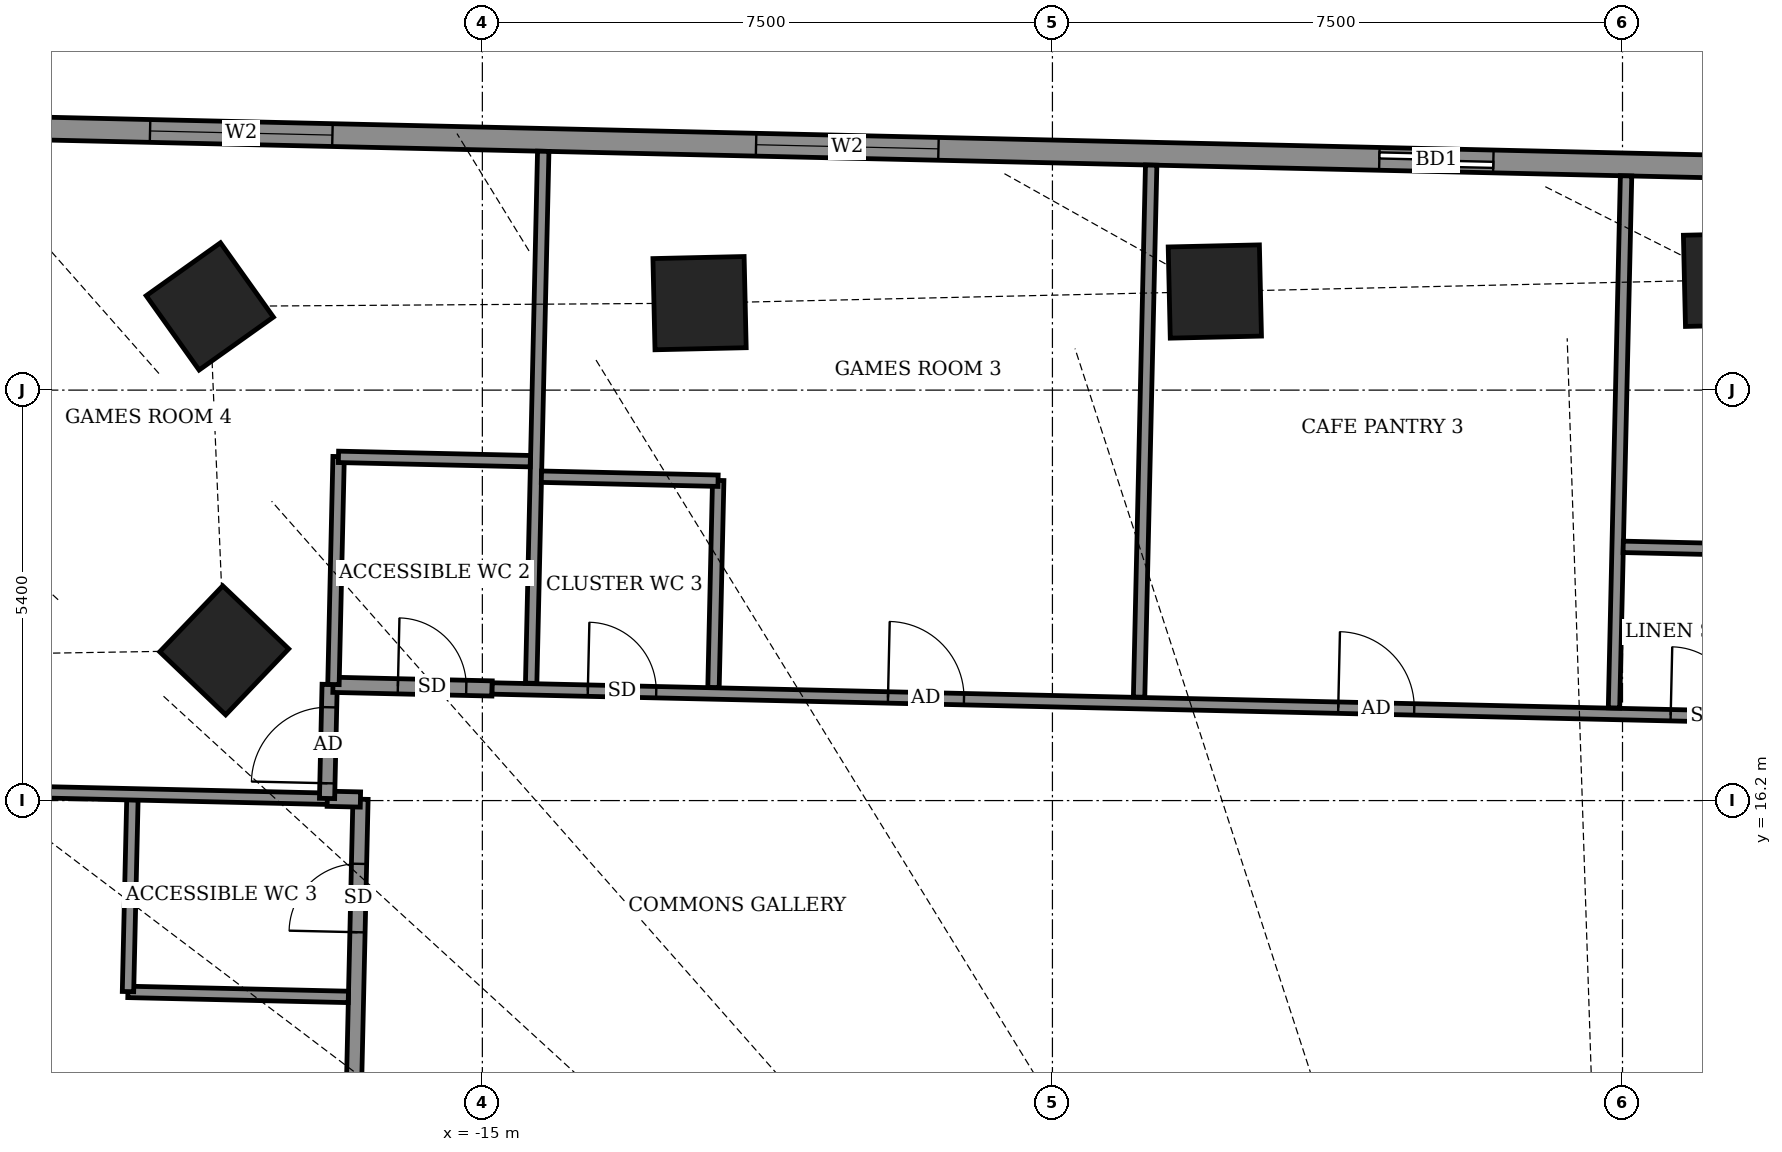
"""IFC4 building model, lengths in metres.
Left out: names, types, materials, properties, quantities, classifications, styles, units other than length and angle.
Written with IfcOpenShell. Run it as: python <this file> out.ifc"""

import sys

from ifc_helpers import new_model, si_unit, direction, frame, frame_2d, origin, origin_2d, place, context, subcontext, project, spatial, rectangle, extrude, element, fill, save


model = new_model("IFC4")
c1 = context("Model", 3, precision=1e-05, world=origin(), true_north=direction((0.0, 1.0)))
c2 = subcontext(c1, "Body", "Model", "MODEL_VIEW")
j1 = project(units=[si_unit("LENGTHUNIT", "METRE"), si_unit("PLANEANGLEUNIT", "RADIAN")], contexts=[c1])
p1 = place(None, origin())
s1 = spatial("IfcSite", under=j1, at=p1, CompositionType="ELEMENT")
p2 = place(p1, origin())
s2 = spatial("IfcBuilding", under=s1, at=p2, CompositionType="ELEMENT")
p3 = place(p2, frame((0.0, 0.0, 193.3)))
s3 = spatial("IfcBuildingStorey", under=s2, at=p3, CompositionType="ELEMENT", Elevation=193.3)
for number, where, z_axis, x_axis in (
    (1, (1.415, 23.051, -0.55), (0.0, 0.0, 1.0), (-1.0, -0.023, 0.0)),
    (2, (-5.364, 22.897, -0.55), (0.0, 0.0, 1.0), (-1.0, -0.023, 0.0)),
    (3, (-12.142, 22.744, -0.55), (0.0, 0.0, 1.0), (-1.0, -0.023, 0.0)),
    (4, (-18.586, 22.701, -0.55), (0.0, 0.0, 1.0), (-0.815, -0.58, 0.0)),
    (5, (-18.396, 18.177, -0.55), (0.0, 0.0, 1.0), (-0.691, -0.723, 0.0)),
):
    element("IfcColumn", number, at=place(p3, frame(where, z_axis=z_axis, x_axis=x_axis)), inside=s3, PredefinedType="COLUMN", context=c2, shape_type="SweptSolid", body=[
        extrude(rectangle(XDim=1.2, YDim=1.2, at=origin_2d()), origin(), (0.0, 0.0, 1.0), 4.6),
    ])
p4 = place(p3, frame((20.437, 24.106, 0.0), z_axis=(0.0, 0.0, 1.0), x_axis=(-0.999742506232, 0.022691875925, 0.0)))
e6 = element("IfcWall", 6, at=p4, inside=s3, PredefinedType="SOLIDWALL", context=c2, shape_type="SweptSolid", body=[
    extrude(rectangle(XDim=42.444, YDim=0.3, at=frame_2d((21.222, 0.0))), origin(), (0.0, 0.0, 1.0), 2.65),
])
p5 = place(p4, frame((1.711, 0.0, 0.0)))
e7 = element("IfcOpeningElement", 7, at=p5, cuts=e6, PredefinedType="OPENING", context=c2, shape_type="SweptSolid", body=[
    extrude(rectangle(XDim=1.5, YDim=2.4, at=frame_2d((0.75, 1.2))), frame((0.0, 0.16, 0.0), z_axis=(0.0, -1.0, 0.0), x_axis=(1.0, 0.0, 0.0)), (0.0, 0.0, 1.0), 0.32),
])
p6 = place(p4, frame((7.769, 0.0, 0.9)))
e8 = element("IfcOpeningElement", 8, at=p6, cuts=e6, PredefinedType="OPENING", context=c2, shape_type="SweptSolid", body=[
    extrude(rectangle(XDim=2.4, YDim=1.5, at=frame_2d((1.2, 0.75))), frame((0.0, 0.16, 0.0), z_axis=(0.0, -1.0, 0.0), x_axis=(1.0, 0.0, 0.0)), (0.0, 0.0, 1.0), 0.32),
])
p7 = place(p4, frame((15.321, 0.0, 0.9)))
e9 = element("IfcOpeningElement", 9, at=p7, cuts=e6, PredefinedType="OPENING", context=c2, shape_type="SweptSolid", body=[
    extrude(rectangle(XDim=2.4, YDim=1.5, at=frame_2d((1.2, 0.75))), frame((0.0, 0.16, 0.0), z_axis=(0.0, -1.0, 0.0), x_axis=(1.0, 0.0, 0.0)), (0.0, 0.0, 1.0), 0.32),
])
p8 = place(p4, frame((22.142, 0.0, 0.0)))
e10 = element("IfcOpeningElement", 10, at=p8, cuts=e6, PredefinedType="OPENING", context=c2, shape_type="SweptSolid", body=[
    extrude(rectangle(XDim=1.5, YDim=2.4, at=frame_2d((0.75, 1.2))), frame((0.0, 0.16, 0.0), z_axis=(0.0, -1.0, 0.0), x_axis=(1.0, 0.0, 0.0)), (0.0, 0.0, 1.0), 0.32),
])
p9 = place(p4, frame((29.444, 0.0, 0.9)))
e11 = element("IfcOpeningElement", 11, at=p9, cuts=e6, PredefinedType="OPENING", context=c2, shape_type="SweptSolid", body=[
    extrude(rectangle(XDim=2.4, YDim=1.5, at=frame_2d((1.2, 0.75))), frame((0.0, 0.16, 0.0), z_axis=(0.0, -1.0, 0.0), x_axis=(1.0, 0.0, 0.0)), (0.0, 0.0, 1.0), 0.32),
])
p10 = place(p4, frame((37.419, 0.0, 0.9)))
e12 = element("IfcOpeningElement", 12, at=p10, cuts=e6, PredefinedType="OPENING", context=c2, shape_type="SweptSolid", body=[
    extrude(rectangle(XDim=2.4, YDim=1.5, at=frame_2d((1.2, 0.75))), frame((0.0, 0.16, 0.0), z_axis=(0.0, -1.0, 0.0), x_axis=(1.0, 0.0, 0.0)), (0.0, 0.0, 1.0), 0.32),
])
p11 = place(p3, frame((-17.247, -12.149, 0.0), z_axis=(0.0, 0.0, 1.0), x_axis=(0.022698146637, 0.999742363881, 0.0)))
e13 = element("IfcWall", 13, at=p11, inside=s3, PredefinedType="PARTITIONING", context=c2, shape_type="SweptSolid", body=[
    extrude(rectangle(XDim=28.374, YDim=0.2, at=frame_2d((14.187, 0.0))), origin(), (0.0, 0.0, 1.0), 2.85),
])
p12 = place(p11, frame((22.9, 0.0, 0.0)))
e14 = element("IfcOpeningElement", 14, at=p12, cuts=e13, PredefinedType="OPENING", context=c2, shape_type="SweptSolid", body=[
    extrude(rectangle(XDim=1.0, YDim=2.1, at=frame_2d((0.5, 1.05))), frame((0.0, 0.11, 0.0), z_axis=(0.0, -1.0, 0.0), x_axis=(1.0, 0.0, 0.0)), (0.0, 0.0, 1.0), 0.22),
])
p13 = place(p11, frame((26.624, 0.0, 0.0)))
e15 = element("IfcOpeningElement", 15, at=p13, cuts=e13, PredefinedType="OPENING", context=c2, shape_type="SweptSolid", body=[
    extrude(rectangle(XDim=0.9, YDim=2.1, at=frame_2d((0.45, 1.05))), frame((0.0, 0.11, 0.0), z_axis=(0.0, -1.0, 0.0), x_axis=(1.0, 0.0, 0.0)), (0.0, 0.0, 1.0), 0.22),
])
p14 = place(p11, frame((16.5, 0.0, 0.0)))
e16 = element("IfcOpeningElement", 16, at=p14, cuts=e13, PredefinedType="OPENING", context=c2, shape_type="SweptSolid", body=[
    extrude(rectangle(XDim=1.0, YDim=2.1, at=frame_2d((0.5, 1.05))), frame((0.0, 0.11, 0.0), z_axis=(0.0, -1.0, 0.0), x_axis=(1.0, 0.0, 0.0)), (0.0, 0.0, 1.0), 0.22),
])
p15 = place(p11, frame((19.275, 0.0, 0.0)))
e17 = element("IfcOpeningElement", 17, at=p15, cuts=e13, PredefinedType="OPENING", context=c2, shape_type="SweptSolid", body=[
    extrude(rectangle(XDim=0.9, YDim=2.1, at=frame_2d((0.45, 1.05))), frame((0.0, 0.11, 0.0), z_axis=(0.0, -1.0, 0.0), x_axis=(1.0, 0.0, 0.0)), (0.0, 0.0, 1.0), 0.22),
])
p16 = place(p11, frame((14.0, 0.0, 0.0)))
e18 = element("IfcOpeningElement", 18, at=p16, cuts=e13, PredefinedType="OPENING", context=c2, shape_type="SweptSolid", body=[
    extrude(rectangle(XDim=1.0, YDim=2.1, at=frame_2d((0.5, 1.05))), frame((0.0, 0.11, 0.0), z_axis=(0.0, -1.0, 0.0), x_axis=(1.0, 0.0, 0.0)), (0.0, 0.0, 1.0), 0.22),
])
p17 = place(p11, frame((11.775, 0.0, 0.0)))
e19 = element("IfcOpeningElement", 19, at=p17, cuts=e13, PredefinedType="OPENING", context=c2, shape_type="SweptSolid", body=[
    extrude(rectangle(XDim=0.9, YDim=2.1, at=frame_2d((0.45, 1.05))), frame((0.0, 0.11, 0.0), z_axis=(0.0, -1.0, 0.0), x_axis=(1.0, 0.0, 0.0)), (0.0, 0.0, 1.0), 0.22),
])
p18 = place(p11, frame((8.712, 0.0, 0.0)))
e20 = element("IfcOpeningElement", 20, at=p18, cuts=e13, PredefinedType="OPENING", context=c2, shape_type="SweptSolid", body=[
    extrude(rectangle(XDim=1.0, YDim=2.1, at=frame_2d((0.5, 1.05))), frame((0.0, 0.11, 0.0), z_axis=(0.0, -1.0, 0.0), x_axis=(1.0, 0.0, 0.0)), (0.0, 0.0, 1.0), 0.22),
])
p19 = place(p11, frame((3.138, 0.0, 0.0)))
e21 = element("IfcOpeningElement", 21, at=p19, cuts=e13, PredefinedType="OPENING", context=c2, shape_type="SweptSolid", body=[
    extrude(rectangle(XDim=1.0, YDim=2.1, at=frame_2d((0.5, 1.05))), frame((0.0, 0.11, 0.0), z_axis=(0.0, -1.0, 0.0), x_axis=(1.0, 0.0, 0.0)), (0.0, 0.0, 1.0), 0.22),
])
p20 = place(p3, frame((-19.663, 13.683, 0.0), z_axis=(0.0, 0.0, 1.0), x_axis=(0.999739876649, -0.022807433839, 0.0)))
e22 = element("IfcWall", 22, at=p20, inside=s3, PredefinedType="PARTITIONING", context=c2, shape_type="SweptSolid", body=[
    extrude(rectangle(XDim=2.901, YDim=0.15, at=frame_2d((1.45, 0.0))), origin(), (0.0, 0.0, 1.0), 2.85),
])
p21 = place(p3, frame((-19.662, 13.687, 0.0), z_axis=(0.0, 0.0, 1.0), x_axis=(0.023015762656, 0.999735102249, 0.0)))
e23 = element("IfcWall", 23, at=p21, inside=s3, PredefinedType="PARTITIONING", context=c2, shape_type="SweptSolid", body=[
    extrude(rectangle(XDim=2.525, YDim=0.15, at=frame_2d((1.262, 0.0))), origin(), (0.0, 0.0, 1.0), 2.85),
])
p22 = place(p3, frame((-26.843, 16.447, 0.0), z_axis=(0.0, 0.0, 1.0), x_axis=(0.999741809847, -0.022722536032, 0.0)))
e24 = element("IfcWall", 24, at=p22, inside=s3, PredefinedType="PARTITIONING", context=c2, shape_type="SweptSolid", body=[
    extrude(rectangle(XDim=9.81, YDim=0.15, at=frame_2d((4.905, 0.0))), origin(), (0.0, 0.0, 1.0), 2.65),
])
p23 = place(p3, frame((-17.04, 16.224, 0.0), z_axis=(0.0, 0.0, 1.0), x_axis=(0.999736607625, -0.022950280466, 0.0)))
e25 = element("IfcWall", 25, at=p23, inside=s3, PredefinedType="PARTITIONING", context=c2, shape_type="SweptSolid", body=[
    extrude(rectangle(XDim=0.436, YDim=0.2, at=frame_2d((0.218, 0.0))), origin(), (0.0, 0.0, 1.0), 2.85),
])
p24 = place(p3, frame((-17.043, 16.228, 0.0), z_axis=(0.0, 0.0, 1.0), x_axis=(0.022617910375, 0.999744182344, 0.0)))
e26 = element("IfcWall", 26, at=p24, inside=s3, PredefinedType="PARTITIONING", context=c2, shape_type="SweptSolid", body=[
    extrude(rectangle(XDim=1.5, YDim=0.2, at=frame_2d((0.75, 0.0))), origin(), (0.0, 0.0, 1.0), 2.85),
])
p25 = place(p24, frame((0.2, 0.0, 0.0)))
e27 = element("IfcOpeningElement", 27, at=p25, cuts=e26, PredefinedType="OPENING", context=c2, shape_type="SweptSolid", body=[
    extrude(rectangle(XDim=1.0, YDim=2.1, at=frame_2d((0.5, 1.05))), frame((0.0, 0.11, 0.0), z_axis=(0.0, -1.0, 0.0), x_axis=(1.0, 0.0, 0.0)), (0.0, 0.0, 1.0), 0.22),
])
p26 = place(p3, frame((-16.965, 17.723, 0.0), z_axis=(0.0, 0.0, 1.0), x_axis=(0.999738756022, -0.022856502529, 0.0)))
e28 = element("IfcWall", 28, at=p26, inside=s3, PredefinedType="PARTITIONING", context=c2, shape_type="SweptSolid", body=[
    extrude(rectangle(XDim=2.094, YDim=0.2, at=frame_2d((1.047, 0.0))), origin(), (0.0, 0.0, 1.0), 2.85),
])
p27 = place(p26, frame((0.854, 0.0, 0.0)))
e29 = element("IfcOpeningElement", 29, at=p27, cuts=e28, PredefinedType="OPENING", context=c2, shape_type="SweptSolid", body=[
    extrude(rectangle(XDim=0.9, YDim=2.1, at=frame_2d((0.45, 1.05))), frame((0.0, 0.11, 0.0), z_axis=(0.0, -1.0, 0.0), x_axis=(1.0, 0.0, 0.0)), (0.0, 0.0, 1.0), 0.22),
])
p28 = place(p3, frame((-14.871, 17.675, 0.0), z_axis=(0.0, 0.0, 1.0), x_axis=(0.999742359486, -0.02269834024, 0.0)))
e30 = element("IfcWall", 30, at=p28, inside=s3, PredefinedType="PARTITIONING", context=c2, shape_type="SweptSolid", body=[
    extrude(rectangle(XDim=30.536, YDim=0.15, at=frame_2d((15.268, 0.0))), origin(), (0.0, 0.0, 1.0), 2.55),
])
p29 = place(p28, frame((24.184, 0.0, 0.0)))
e31 = element("IfcOpeningElement", 31, at=p29, cuts=e30, PredefinedType="OPENING", context=c2, shape_type="SweptSolid", body=[
    extrude(rectangle(XDim=1.0, YDim=2.1, at=frame_2d((0.5, 1.05))), frame((0.0, 0.085, 0.0), z_axis=(0.0, -1.0, 0.0), x_axis=(1.0, 0.0, 0.0)), (0.0, 0.0, 1.0), 0.17),
])
p30 = place(p28, frame((27.359, 0.0, 0.0)))
e32 = element("IfcOpeningElement", 32, at=p30, cuts=e30, PredefinedType="OPENING", context=c2, shape_type="SweptSolid", body=[
    extrude(rectangle(XDim=0.9, YDim=2.1, at=frame_2d((0.45, 1.05))), frame((0.0, 0.085, 0.0), z_axis=(0.0, -1.0, 0.0), x_axis=(1.0, 0.0, 0.0)), (0.0, 0.0, 1.0), 0.17),
])
p31 = place(p28, frame((19.459, 0.0, 0.0)))
e33 = element("IfcOpeningElement", 33, at=p31, cuts=e30, PredefinedType="OPENING", context=c2, shape_type="SweptSolid", body=[
    extrude(rectangle(XDim=1.0, YDim=2.1, at=frame_2d((0.5, 1.05))), frame((0.0, 0.085, 0.0), z_axis=(0.0, -1.0, 0.0), x_axis=(1.0, 0.0, 0.0)), (0.0, 0.0, 1.0), 0.17),
])
p32 = place(p28, frame((15.509, 0.0, 0.0)))
e34 = element("IfcOpeningElement", 34, at=p32, cuts=e30, PredefinedType="OPENING", context=c2, shape_type="SweptSolid", body=[
    extrude(rectangle(XDim=0.9, YDim=2.1, at=frame_2d((0.45, 1.05))), frame((0.0, 0.085, 0.0), z_axis=(0.0, -1.0, 0.0), x_axis=(1.0, 0.0, 0.0)), (0.0, 0.0, 1.0), 0.17),
])
p33 = place(p28, frame((11.134, 0.0, 0.0)))
e35 = element("IfcOpeningElement", 35, at=p33, cuts=e30, PredefinedType="OPENING", context=c2, shape_type="SweptSolid", body=[
    extrude(rectangle(XDim=1.0, YDim=2.1, at=frame_2d((0.5, 1.05))), frame((0.0, 0.085, 0.0), z_axis=(0.0, -1.0, 0.0), x_axis=(1.0, 0.0, 0.0)), (0.0, 0.0, 1.0), 0.17),
])
p34 = place(p28, frame((5.209, 0.0, 0.0)))
e36 = element("IfcOpeningElement", 36, at=p34, cuts=e30, PredefinedType="OPENING", context=c2, shape_type="SweptSolid", body=[
    extrude(rectangle(XDim=1.0, YDim=2.1, at=frame_2d((0.5, 1.05))), frame((0.0, 0.085, 0.0), z_axis=(0.0, -1.0, 0.0), x_axis=(1.0, 0.0, 0.0)), (0.0, 0.0, 1.0), 0.17),
])
p35 = place(p28, frame((1.259, 0.0, 0.0)))
e37 = element("IfcOpeningElement", 37, at=p35, cuts=e30, PredefinedType="OPENING", context=c2, shape_type="SweptSolid", body=[
    extrude(rectangle(XDim=0.9, YDim=2.1, at=frame_2d((0.45, 1.05))), frame((0.0, 0.085, 0.0), z_axis=(0.0, -1.0, 0.0), x_axis=(1.0, 0.0, 0.0)), (0.0, 0.0, 1.0), 0.17),
])
p36 = place(p3, frame((-16.959, 17.727, 0.0), z_axis=(0.0, 0.0, 1.0), x_axis=(0.022625271604, 0.999744015778, 0.0)))
e38 = element("IfcWall", 38, at=p36, inside=s3, PredefinedType="PARTITIONING", context=c2, shape_type="SweptSolid", body=[
    extrude(rectangle(XDim=3.0, YDim=0.15, at=frame_2d((1.5, 0.0))), origin(), (0.0, 0.0, 1.0), 2.85),
])
p37 = place(p3, frame((-14.358, 17.743, 0.0), z_axis=(0.0, 0.0, 1.0), x_axis=(0.022702393474, 0.999742267452, 0.0)))
e39 = element("IfcWall", 39, at=p37, inside=s3, PredefinedType="PARTITIONING", context=c2, shape_type="SweptSolid", body=[
    extrude(rectangle(XDim=7.001, YDim=0.15, at=frame_2d((3.5, 0.0))), origin(), (0.0, 0.0, 1.0), 2.65),
])
p38 = place(p3, frame((-11.959, 17.688, 0.0), z_axis=(0.0, 0.0, 1.0), x_axis=(0.022758040381, 0.999741002259, 0.0)))
e40 = element("IfcWall", 40, at=p38, inside=s3, PredefinedType="PARTITIONING", context=c2, shape_type="SweptSolid", body=[
    extrude(rectangle(XDim=2.725, YDim=0.15, at=frame_2d((1.362, 0.0))), origin(), (0.0, 0.0, 1.0), 2.75),
])
p39 = place(p3, frame((-6.36, 17.561, 0.0), z_axis=(0.0, 0.0, 1.0), x_axis=(0.022737248567, 0.999741475346, 0.0)))
e41 = element("IfcWall", 41, at=p39, inside=s3, PredefinedType="PARTITIONING", context=c2, shape_type="SweptSolid", body=[
    extrude(rectangle(XDim=7.001, YDim=0.15, at=frame_2d((3.5, 0.0))), origin(), (0.0, 0.0, 1.0), 2.65),
])
p40 = place(p3, frame((-0.112, 17.419, 0.0), z_axis=(0.0, 0.0, 1.0), x_axis=(0.022734078158, 0.999741547446, 0.0)))
e42 = element("IfcWall", 42, at=p40, inside=s3, PredefinedType="PARTITIONING", context=c2, shape_type="SweptSolid", body=[
    extrude(rectangle(XDim=7.002, YDim=0.15, at=frame_2d((3.501, 0.0))), origin(), (0.0, 0.0, 1.0), 2.65),
])
p41 = place(p3, frame((0.009, 19.538, 0.0), z_axis=(0.0, 0.0, 1.0), x_axis=(0.999740478815, -0.022781023197, 0.0)))
e43 = element("IfcWall", 43, at=p41, inside=s3, PredefinedType="PARTITIONING", context=c2, shape_type="SweptSolid", body=[
    extrude(rectangle(XDim=2.325, YDim=0.15, at=frame_2d((1.163, 0.0))), origin(), (0.0, 0.0, 1.0), 2.85),
])
p42 = place(p3, frame((-14.223, 20.461, 0.0), z_axis=(0.0, 0.0, 1.0), x_axis=(0.999740260747, -0.02279059109, 0.0)))
e44 = element("IfcWall", 44, at=p42, inside=s3, PredefinedType="PARTITIONING", context=c2, shape_type="SweptSolid", body=[
    extrude(rectangle(XDim=2.324, YDim=0.15, at=frame_2d((1.162, 0.0))), origin(), (0.0, 0.0, 1.0), 2.75),
])
p43 = place(p3, frame((-16.893, 20.722, 0.0), z_axis=(0.0, 0.0, 1.0), x_axis=(0.999746160391, -0.022530308093, 0.0)))
e45 = element("IfcWall", 45, at=p43, inside=s3, PredefinedType="PARTITIONING", context=c2, shape_type="SweptSolid", body=[
    extrude(rectangle(XDim=2.525, YDim=0.15, at=frame_2d((1.262, 0.0))), origin(), (0.0, 0.0, 1.0), 4.05),
])
p44 = place(p8, origin())
e46 = element("IfcDoor", 46, at=p44, inside=s3, OperationType="SLIDING_TO_LEFT", PredefinedType="DOOR", context=c2, shape_type="SweptSolid", body=[
    extrude(rectangle(XDim=1.5, YDim=2.4, at=frame_2d((0.75, 1.2))), frame((0.0, 0.025, 0.0), z_axis=(0.0, -1.0, 0.0), x_axis=(1.0, 0.0, 0.0)), (0.0, 0.0, 1.0), 0.05),
])
fill(e10, e46)
p45 = place(p9, origin())
e47 = element("IfcWindow", 47, at=p45, inside=s3, PartitioningType="DOUBLE_PANEL_VERTICAL", PredefinedType="WINDOW", context=c2, shape_type="SweptSolid", body=[
    extrude(rectangle(XDim=2.4, YDim=1.5, at=frame_2d((1.2, 0.75))), frame((0.0, 0.03, 0.0), z_axis=(0.0, -1.0, 0.0), x_axis=(1.0, 0.0, 0.0)), (0.0, 0.0, 1.0), 0.06),
])
fill(e11, e47)
p46 = place(p10, origin())
e48 = element("IfcWindow", 48, at=p46, inside=s3, PartitioningType="DOUBLE_PANEL_VERTICAL", PredefinedType="WINDOW", context=c2, shape_type="SweptSolid", body=[
    extrude(rectangle(XDim=2.4, YDim=1.5, at=frame_2d((1.2, 0.75))), frame((0.0, 0.03, 0.0), z_axis=(0.0, -1.0, 0.0), x_axis=(1.0, 0.0, 0.0)), (0.0, 0.0, 1.0), 0.06),
])
fill(e12, e48)
p47 = place(p32, origin())
e49 = element("IfcDoor", 49, at=p47, inside=s3, OperationType="SINGLE_SWING_RIGHT", PredefinedType="DOOR", context=c2, shape_type="SweptSolid", body=[
    extrude(rectangle(XDim=0.9, YDim=2.1, at=frame_2d((0.45, 1.05))), frame((0.0, 0.025, 0.0), z_axis=(0.0, -1.0, 0.0), x_axis=(1.0, 0.0, 0.0)), (0.0, 0.0, 1.0), 0.05),
])
fill(e34, e49)
p48 = place(p33, origin())
e50 = element("IfcDoor", 50, at=p48, inside=s3, OperationType="SINGLE_SWING_LEFT", PredefinedType="DOOR", context=c2, shape_type="SweptSolid", body=[
    extrude(rectangle(XDim=1.0, YDim=2.1, at=frame_2d((0.5, 1.05))), frame((0.0, 0.025, 0.0), z_axis=(0.0, -1.0, 0.0), x_axis=(1.0, 0.0, 0.0)), (0.0, 0.0, 1.0), 0.05),
])
fill(e35, e50)
p49 = place(p34, origin())
e51 = element("IfcDoor", 51, at=p49, inside=s3, OperationType="SINGLE_SWING_RIGHT", PredefinedType="DOOR", context=c2, shape_type="SweptSolid", body=[
    extrude(rectangle(XDim=1.0, YDim=2.1, at=frame_2d((0.5, 1.05))), frame((0.0, 0.025, 0.0), z_axis=(0.0, -1.0, 0.0), x_axis=(1.0, 0.0, 0.0)), (0.0, 0.0, 1.0), 0.05),
])
fill(e36, e51)
p50 = place(p35, origin())
e52 = element("IfcDoor", 52, at=p50, inside=s3, OperationType="SINGLE_SWING_LEFT", PredefinedType="DOOR", context=c2, shape_type="SweptSolid", body=[
    extrude(rectangle(XDim=0.9, YDim=2.1, at=frame_2d((0.45, 1.05))), frame((0.0, 0.025, 0.0), z_axis=(0.0, -1.0, 0.0), x_axis=(1.0, 0.0, 0.0)), (0.0, 0.0, 1.0), 0.05),
])
fill(e37, e52)
p51 = place(p25, origin())
e53 = element("IfcDoor", 53, at=p51, inside=s3, OperationType="SINGLE_SWING_LEFT", PredefinedType="DOOR", context=c2, shape_type="SweptSolid", body=[
    extrude(rectangle(XDim=1.0, YDim=2.1, at=frame_2d((0.5, 1.05))), frame((0.0, 0.025, 0.0), z_axis=(0.0, -1.0, 0.0), x_axis=(1.0, 0.0, 0.0)), (0.0, 0.0, 1.0), 0.05),
])
fill(e27, e53)
p52 = place(p27, origin())
e54 = element("IfcDoor", 54, at=p52, inside=s3, OperationType="SINGLE_SWING_RIGHT", PredefinedType="DOOR", context=c2, shape_type="SweptSolid", body=[
    extrude(rectangle(XDim=0.9, YDim=2.1, at=frame_2d((0.45, 1.05))), frame((0.0, 0.025, 0.0), z_axis=(0.0, -1.0, 0.0), x_axis=(1.0, 0.0, 0.0)), (0.0, 0.0, 1.0), 0.05),
])
fill(e29, e54)
p53 = place(p13, origin())
e55 = element("IfcDoor", 55, at=p53, inside=s3, OperationType="SINGLE_SWING_LEFT", PredefinedType="DOOR", context=c2, shape_type="SweptSolid", body=[
    extrude(rectangle(XDim=0.9, YDim=2.1, at=frame_2d((0.45, 1.05))), frame((0.0, 0.025, 0.0), z_axis=(0.0, -1.0, 0.0), x_axis=(1.0, 0.0, 0.0)), (0.0, 0.0, 1.0), 0.05),
])
fill(e15, e55)
save(model, sys.argv[1])
